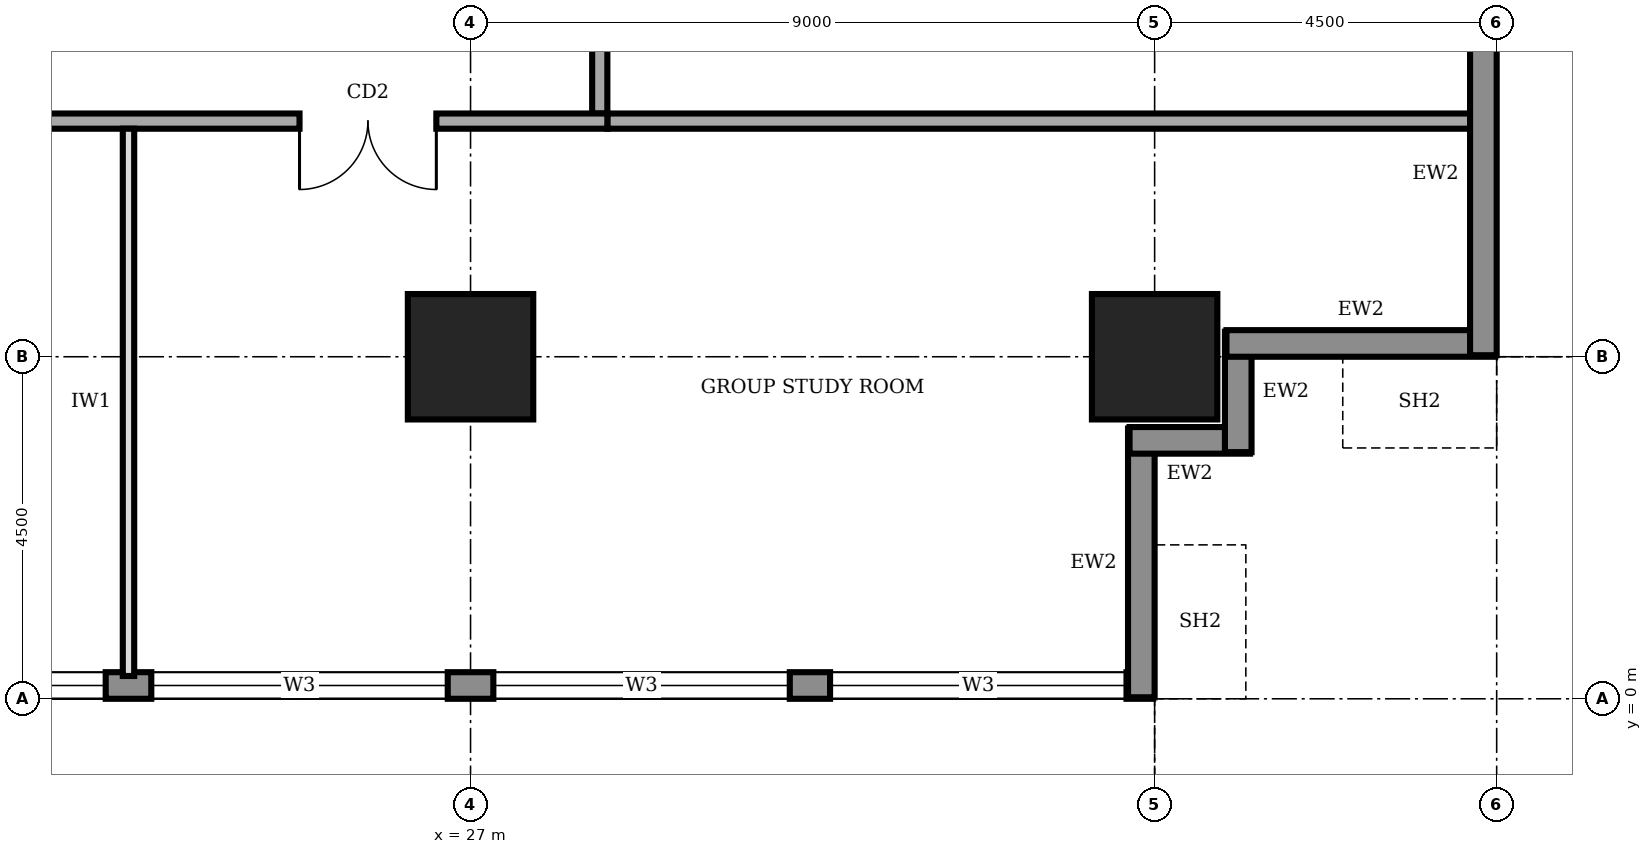
"""IFC4 building model, lengths in metres.
Left out: names, types, materials, properties, quantities, classifications, styles, units other than length and angle.
Written with IfcOpenShell. Run it as: python <this file> out.ifc"""

import sys

from ifc_helpers import new_model, si_unit, direction, frame, frame_2d, origin, origin_2d, place, context, subcontext, project, spatial, rectangle, extrude, element, fill, save


model = new_model("IFC4")
c1 = context("Model", 3, precision=1e-05, world=origin(), true_north=direction((0.0, 1.0)))
c2 = subcontext(c1, "Body", "Model", "MODEL_VIEW")
j1 = project(units=[si_unit("LENGTHUNIT", "METRE"), si_unit("PLANEANGLEUNIT", "RADIAN")], contexts=[c1])
p1 = place(None, origin())
s1 = spatial("IfcSite", under=j1, at=p1, CompositionType="ELEMENT")
p2 = place(p1, origin())
s2 = spatial("IfcBuilding", under=s1, at=p2, CompositionType="ELEMENT")
p3 = place(p2, frame((0.0, 0.0, 189.0)))
s3 = spatial("IfcBuildingStorey", under=s2, at=p3, CompositionType="ELEMENT", Elevation=189.0)
for number, where, z_axis, x_axis in (
    (1, (27.0, 4.5, 0.0), (0.0, 0.0, 1.0), (1.0, 0.0, 0.0)),
    (2, (36.0, 4.5, 0.0), (0.0, 0.0, 1.0), (1.0, 0.0, 0.0)),
):
    element("IfcColumn", number, at=place(p3, frame(where, z_axis=z_axis, x_axis=x_axis)), inside=s3, PredefinedType="COLUMN", context=c2, shape_type="SweptSolid", body=[
        extrude(rectangle(XDim=1.65, YDim=1.65, at=origin_2d()), origin(), (0.0, 0.0, 1.0), 4.0),
    ])
p4 = place(p3, frame((4.52, 0.175, 0.0), z_axis=(0.0, 0.0, 1.0), x_axis=(1.0, 0.0, 0.0)))
e3 = element("IfcWall", 3, at=p4, inside=s3, PredefinedType="STANDARD", context=c2, shape_type="SweptSolid", body=[
    extrude(rectangle(XDim=31.46, YDim=0.35, at=frame_2d((15.73, 0.0))), origin(), (0.0, 0.0, 1.0), 3.75),
])
p5 = place(p4, frame((4.78, 0.0, 0.95)))
e4 = element("IfcOpeningElement", 4, at=p5, cuts=e3, PredefinedType="OPENING", context=c2, shape_type="SweptSolid", body=[
    extrude(rectangle(XDim=3.9, YDim=1.8, at=frame_2d((1.95, 0.9))), frame((0.0, 0.185, 0.0), z_axis=(0.0, -1.0, 0.0), x_axis=(1.0, 0.0, 0.0)), (0.0, 0.0, 1.0), 0.37),
])
p6 = place(p4, frame((9.28, 0.0, 0.95)))
e5 = element("IfcOpeningElement", 5, at=p6, cuts=e3, PredefinedType="OPENING", context=c2, shape_type="SweptSolid", body=[
    extrude(rectangle(XDim=3.9, YDim=1.8, at=frame_2d((1.95, 0.9))), frame((0.0, 0.185, 0.0), z_axis=(0.0, -1.0, 0.0), x_axis=(1.0, 0.0, 0.0)), (0.0, 0.0, 1.0), 0.37),
])
p7 = place(p4, frame((13.78, 0.0, 0.95)))
e6 = element("IfcOpeningElement", 6, at=p7, cuts=e3, PredefinedType="OPENING", context=c2, shape_type="SweptSolid", body=[
    extrude(rectangle(XDim=3.9, YDim=1.8, at=frame_2d((1.95, 0.9))), frame((0.0, 0.185, 0.0), z_axis=(0.0, -1.0, 0.0), x_axis=(1.0, 0.0, 0.0)), (0.0, 0.0, 1.0), 0.37),
])
p8 = place(p4, frame((18.28, 0.0, 0.95)))
e7 = element("IfcOpeningElement", 7, at=p8, cuts=e3, PredefinedType="OPENING", context=c2, shape_type="SweptSolid", body=[
    extrude(rectangle(XDim=3.9, YDim=1.8, at=frame_2d((1.95, 0.9))), frame((0.0, 0.185, 0.0), z_axis=(0.0, -1.0, 0.0), x_axis=(1.0, 0.0, 0.0)), (0.0, 0.0, 1.0), 0.37),
])
p9 = place(p4, frame((22.78, 0.0, 0.95)))
e8 = element("IfcOpeningElement", 8, at=p9, cuts=e3, PredefinedType="OPENING", context=c2, shape_type="SweptSolid", body=[
    extrude(rectangle(XDim=3.9, YDim=1.8, at=frame_2d((1.95, 0.9))), frame((0.0, 0.185, 0.0), z_axis=(0.0, -1.0, 0.0), x_axis=(1.0, 0.0, 0.0)), (0.0, 0.0, 1.0), 0.37),
])
p10 = place(p4, frame((27.21, 0.0, 0.95)))
e9 = element("IfcOpeningElement", 9, at=p10, cuts=e3, PredefinedType="OPENING", context=c2, shape_type="SweptSolid", body=[
    extrude(rectangle(XDim=3.9, YDim=1.8, at=frame_2d((1.95, 0.9))), frame((0.0, 0.185, 0.0), z_axis=(0.0, -1.0, 0.0), x_axis=(1.0, 0.0, 0.0)), (0.0, 0.0, 1.0), 0.37),
])
p11 = place(p3, frame((35.825, 0.02, 0.0), z_axis=(0.0, 0.0, 1.0), x_axis=(0.0, 1.0, 0.0)))
e10 = element("IfcWall", 10, at=p11, inside=s3, PredefinedType="STANDARD", context=c2, shape_type="SweptSolid", body=[
    extrude(rectangle(XDim=3.535, YDim=0.35, at=frame_2d((1.768, 0.0))), origin(), (0.0, 0.0, 1.0), 2.85),
])
for number, where, z_axis, x_axis in (
    (11, (35.67, 3.4, 0.0), (0.0, 0.0, 1.0), (1.0, 0.0, 0.0)),
    (12, (37.1, 3.245, 0.0), (0.0, 0.0, 1.0), (0.0, 1.0, 0.0)),
):
    element("IfcWall", number, at=place(p3, frame(where, z_axis=z_axis, x_axis=x_axis)), inside=s3, PredefinedType="STANDARD", context=c2, shape_type="SweptSolid", body=[
        extrude(rectangle(XDim=1.585, YDim=0.35, at=frame_2d((0.792, 0.0))), origin(), (0.0, 0.0, 1.0), 3.75),
    ])
p12 = place(p3, frame((36.945, 4.675, 0.0), z_axis=(0.0, 0.0, 1.0), x_axis=(1.0, 0.0, 0.0)))
e13 = element("IfcWall", 13, at=p12, inside=s3, PredefinedType="STANDARD", context=c2, shape_type="SweptSolid", body=[
    extrude(rectangle(XDim=3.535, YDim=0.35, at=frame_2d((1.768, 0.0))), origin(), (0.0, 0.0, 1.0), 2.85),
])
p13 = place(p3, frame((40.325, 4.52, 0.0), z_axis=(0.0, 0.0, 1.0), x_axis=(0.0, 1.0, 0.0)))
e14 = element("IfcWall", 14, at=p13, inside=s3, PredefinedType="STANDARD", context=c2, shape_type="SweptSolid", body=[
    extrude(rectangle(XDim=31.46, YDim=0.35, at=frame_2d((15.73, 0.0))), origin(), (0.0, 0.0, 1.0), 3.75),
])
p14 = place(p13, frame((4.78, 0.0, 0.95)))
e15 = element("IfcOpeningElement", 15, at=p14, cuts=e14, PredefinedType="OPENING", context=c2, shape_type="SweptSolid", body=[
    extrude(rectangle(XDim=3.9, YDim=1.8, at=frame_2d((1.95, 0.9))), frame((0.0, 0.185, 0.0), z_axis=(0.0, -1.0, 0.0), x_axis=(1.0, 0.0, 0.0)), (0.0, 0.0, 1.0), 0.37),
])
p15 = place(p13, frame((9.28, 0.0, 0.95)))
e16 = element("IfcOpeningElement", 16, at=p15, cuts=e14, PredefinedType="OPENING", context=c2, shape_type="SweptSolid", body=[
    extrude(rectangle(XDim=3.9, YDim=1.8, at=frame_2d((1.95, 0.9))), frame((0.0, 0.185, 0.0), z_axis=(0.0, -1.0, 0.0), x_axis=(1.0, 0.0, 0.0)), (0.0, 0.0, 1.0), 0.37),
])
p16 = place(p13, frame((13.78, 0.0, 0.95)))
e17 = element("IfcOpeningElement", 17, at=p16, cuts=e14, PredefinedType="OPENING", context=c2, shape_type="SweptSolid", body=[
    extrude(rectangle(XDim=3.9, YDim=1.8, at=frame_2d((1.95, 0.9))), frame((0.0, 0.185, 0.0), z_axis=(0.0, -1.0, 0.0), x_axis=(1.0, 0.0, 0.0)), (0.0, 0.0, 1.0), 0.37),
])
p17 = place(p13, frame((18.28, 0.0, 0.95)))
e18 = element("IfcOpeningElement", 18, at=p17, cuts=e14, PredefinedType="OPENING", context=c2, shape_type="SweptSolid", body=[
    extrude(rectangle(XDim=3.9, YDim=1.8, at=frame_2d((1.95, 0.9))), frame((0.0, 0.185, 0.0), z_axis=(0.0, -1.0, 0.0), x_axis=(1.0, 0.0, 0.0)), (0.0, 0.0, 1.0), 0.37),
])
p18 = place(p13, frame((22.78, 0.0, 0.95)))
e19 = element("IfcOpeningElement", 19, at=p18, cuts=e14, PredefinedType="OPENING", context=c2, shape_type="SweptSolid", body=[
    extrude(rectangle(XDim=3.9, YDim=1.8, at=frame_2d((1.95, 0.9))), frame((0.0, 0.185, 0.0), z_axis=(0.0, -1.0, 0.0), x_axis=(1.0, 0.0, 0.0)), (0.0, 0.0, 1.0), 0.37),
])
p19 = place(p13, frame((27.21, 0.0, 0.95)))
e20 = element("IfcOpeningElement", 20, at=p19, cuts=e14, PredefinedType="OPENING", context=c2, shape_type="SweptSolid", body=[
    extrude(rectangle(XDim=3.9, YDim=1.8, at=frame_2d((1.95, 0.9))), frame((0.0, 0.185, 0.0), z_axis=(0.0, -1.0, 0.0), x_axis=(1.0, 0.0, 0.0)), (0.0, 0.0, 1.0), 0.37),
])
p20 = place(p3, frame((11.9, 7.6, 0.0), z_axis=(0.0, 0.0, 1.0), x_axis=(1.0, 0.0, 0.0)))
e21 = element("IfcWall", 21, at=p20, inside=s3, PredefinedType="SOLIDWALL", context=c2, shape_type="SweptSolid", body=[
    extrude(rectangle(XDim=16.9, YDim=0.2, at=frame_2d((8.45, 0.0))), origin(), (0.0, 0.0, 1.0), 3.75),
])
p21 = place(p20, frame((2.05, 0.0, 0.0)))
e22 = element("IfcOpeningElement", 22, at=p21, cuts=e21, PredefinedType="OPENING", context=c2, shape_type="SweptSolid", body=[
    extrude(rectangle(XDim=1.8, YDim=2.1, at=frame_2d((0.9, 1.05))), frame((0.0, 0.11, 0.0), z_axis=(0.0, -1.0, 0.0), x_axis=(1.0, 0.0, 0.0)), (0.0, 0.0, 1.0), 0.22),
])
p22 = place(p20, frame((7.85, 0.0, 0.0)))
e23 = element("IfcOpeningElement", 23, at=p22, cuts=e21, PredefinedType="OPENING", context=c2, shape_type="SweptSolid", body=[
    extrude(rectangle(XDim=1.0, YDim=2.1, at=frame_2d((0.5, 1.05))), frame((0.0, 0.11, 0.0), z_axis=(0.0, -1.0, 0.0), x_axis=(1.0, 0.0, 0.0)), (0.0, 0.0, 1.0), 0.22),
])
p23 = place(p20, frame((12.85, 0.0, 0.0)))
e24 = element("IfcOpeningElement", 24, at=p23, cuts=e21, PredefinedType="OPENING", context=c2, shape_type="SweptSolid", body=[
    extrude(rectangle(XDim=1.8, YDim=2.1, at=frame_2d((0.9, 1.05))), frame((0.0, 0.11, 0.0), z_axis=(0.0, -1.0, 0.0), x_axis=(1.0, 0.0, 0.0)), (0.0, 0.0, 1.0), 0.22),
])
p24 = place(p3, frame((28.7, 7.7, 0.0), z_axis=(0.0, 0.0, 1.0), x_axis=(0.0, 1.0, 0.0)))
e25 = element("IfcWall", 25, at=p24, inside=s3, PredefinedType="SOLIDWALL", context=c2, shape_type="SweptSolid", body=[
    extrude(rectangle(XDim=25.3, YDim=0.2, at=frame_2d((12.65, 0.0))), origin(), (0.0, 0.0, 1.0), 3.75),
])
p25 = place(p24, frame((4.15, 0.0, 0.0)))
e26 = element("IfcOpeningElement", 26, at=p25, cuts=e25, PredefinedType="OPENING", context=c2, shape_type="SweptSolid", body=[
    extrude(rectangle(XDim=1.8, YDim=2.1, at=frame_2d((0.9, 1.05))), frame((0.0, 0.11, 0.0), z_axis=(0.0, -1.0, 0.0), x_axis=(1.0, 0.0, 0.0)), (0.0, 0.0, 1.0), 0.22),
])
p26 = place(p24, frame((17.1, 0.0, 0.0)))
e27 = element("IfcOpeningElement", 27, at=p26, cuts=e25, PredefinedType="OPENING", context=c2, shape_type="SweptSolid", body=[
    extrude(rectangle(XDim=1.4, YDim=2.1, at=frame_2d((0.7, 1.05))), frame((0.0, 0.11, 0.0), z_axis=(0.0, -1.0, 0.0), x_axis=(1.0, 0.0, 0.0)), (0.0, 0.0, 1.0), 0.22),
])
p27 = place(p3, frame((28.8, 7.6, 0.0), z_axis=(0.0, 0.0, 1.0), x_axis=(1.0, 0.0, 0.0)))
e28 = element("IfcWall", 28, at=p27, inside=s3, PredefinedType="SOLIDWALL", context=c2, shape_type="SweptSolid", body=[
    extrude(rectangle(XDim=11.4, YDim=0.2, at=frame_2d((5.7, 0.0))), origin(), (0.0, 0.0, 1.0), 3.75),
])
p28 = place(p3, frame((22.5, 0.3, 0.0), z_axis=(0.0, 0.0, 1.0), x_axis=(0.0, 1.0, 0.0)))
e29 = element("IfcWall", 29, at=p28, inside=s3, PredefinedType="PARTITIONING", context=c2, shape_type="SweptSolid", body=[
    extrude(rectangle(XDim=7.2, YDim=0.15, at=frame_2d((3.6, 0.0))), origin(), (0.0, 0.0, 1.0), 3.75),
])
p29 = place(p7, origin())
e30 = element("IfcWindow", 30, at=p29, inside=s3, PartitioningType="SINGLE_PANEL", PredefinedType="WINDOW", context=c2, shape_type="SweptSolid", body=[
    extrude(rectangle(XDim=3.9, YDim=1.8, at=frame_2d((1.95, 0.9))), frame((0.0, 0.03, 0.0), z_axis=(0.0, -1.0, 0.0), x_axis=(1.0, 0.0, 0.0)), (0.0, 0.0, 1.0), 0.06),
])
fill(e6, e30)
p30 = place(p8, origin())
e31 = element("IfcWindow", 31, at=p30, inside=s3, PartitioningType="SINGLE_PANEL", PredefinedType="WINDOW", context=c2, shape_type="SweptSolid", body=[
    extrude(rectangle(XDim=3.9, YDim=1.8, at=frame_2d((1.95, 0.9))), frame((0.0, 0.03, 0.0), z_axis=(0.0, -1.0, 0.0), x_axis=(1.0, 0.0, 0.0)), (0.0, 0.0, 1.0), 0.06),
])
fill(e7, e31)
p31 = place(p9, origin())
e32 = element("IfcWindow", 32, at=p31, inside=s3, PartitioningType="SINGLE_PANEL", PredefinedType="WINDOW", context=c2, shape_type="SweptSolid", body=[
    extrude(rectangle(XDim=3.9, YDim=1.8, at=frame_2d((1.95, 0.9))), frame((0.0, 0.03, 0.0), z_axis=(0.0, -1.0, 0.0), x_axis=(1.0, 0.0, 0.0)), (0.0, 0.0, 1.0), 0.06),
])
fill(e8, e32)
p32 = place(p10, origin())
e33 = element("IfcWindow", 33, at=p32, inside=s3, PartitioningType="SINGLE_PANEL", PredefinedType="WINDOW", context=c2, shape_type="SweptSolid", body=[
    extrude(rectangle(XDim=3.9, YDim=1.8, at=frame_2d((1.95, 0.9))), frame((0.0, 0.03, 0.0), z_axis=(0.0, -1.0, 0.0), x_axis=(1.0, 0.0, 0.0)), (0.0, 0.0, 1.0), 0.06),
])
fill(e9, e33)
p33 = place(p23, frame((1.8, 0.0, 0.0), z_axis=(0.0, 0.0, 1.0), x_axis=(-1.0, 0.0, 0.0)))
e34 = element("IfcDoor", 34, at=p33, inside=s3, OperationType="DOUBLE_DOOR_SINGLE_SWING", PredefinedType="DOOR", context=c2, shape_type="SweptSolid", body=[
    extrude(rectangle(XDim=1.8, YDim=2.1, at=frame_2d((0.9, 1.05))), frame((0.0, 0.025, 0.0), z_axis=(0.0, -1.0, 0.0), x_axis=(1.0, 0.0, 0.0)), (0.0, 0.0, 1.0), 0.05),
])
fill(e24, e34)
save(model, sys.argv[1])
